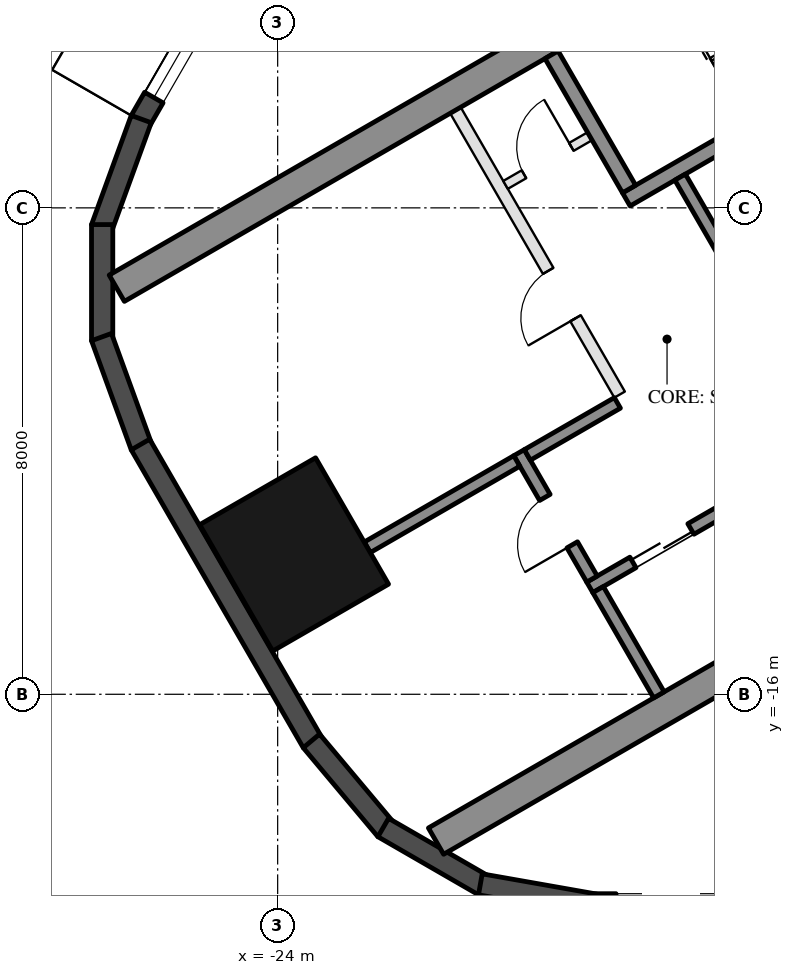
"""IFC4 building model, lengths in metres.
Left out: names, types, materials, properties, quantities, classifications, styles, units other than length and angle.
Written with IfcOpenShell. Run it as: python <this file> out.ifc"""

import sys

from ifc_helpers import new_model, si_unit, direction, frame, frame_2d, origin, origin_2d, place, context, subcontext, project, spatial, rectangle, hollow_rectangle, extrude, element, fill, save


model = new_model("IFC4")
c1 = context("Model", 3, precision=1e-05, world=origin(), true_north=direction((0.0, 1.0)))
c2 = subcontext(c1, "Body", "Model", "MODEL_VIEW")
j1 = project(units=[si_unit("LENGTHUNIT", "METRE"), si_unit("PLANEANGLEUNIT", "RADIAN")], contexts=[c1])
p1 = place(None, origin())
s1 = spatial("IfcSite", under=j1, at=p1, CompositionType="ELEMENT")
p2 = place(p1, origin())
s2 = spatial("IfcBuilding", under=s1, at=p2, CompositionType="ELEMENT")
p3 = place(p2, frame((0.0, 0.0, 154.0)))
s3 = spatial("IfcBuildingStorey", under=s2, at=p3, CompositionType="ELEMENT", Elevation=154.0)
p4 = place(p3, frame((-23.729, -13.7, 0.0), z_axis=(0.0, 0.0, 1.0), x_axis=(-0.5, 0.866025403784, 0.0)))
e1 = element("IfcColumn", 1, at=p4, inside=s3, PredefinedType="COLUMN", context=c2, shape_type="SweptSolid", body=[
    extrude(hollow_rectangle(XDim=2.4, YDim=2.2, WallThickness=0.06, at=origin_2d()), origin(), (0.0, 0.0, 1.0), 3.7),
])
p5 = place(p3, frame((-24.299, -3.176, 0.0), z_axis=(0.0, 0.0, 1.0), x_axis=(-0.500028278809, -0.866009076391, 0.0)))
e2 = element("IfcWall", 2, at=p5, inside=s3, PredefinedType="SOLIDWALL", context=c2, shape_type="SweptSolid", body=[
    extrude(rectangle(XDim=3.916, YDim=0.35, at=frame_2d((1.958, 0.0))), origin(), (0.0, 0.0, 1.0), 3.55),
])
p6 = place(p5, frame((1.675, 0.0, 0.3)))
e3 = element("IfcOpeningElement", 3, at=p6, cuts=e2, PredefinedType="OPENING", context=c2, shape_type="SweptSolid", body=[
    extrude(rectangle(XDim=1.8, YDim=2.65, at=frame_2d((0.9, 1.325))), frame((0.0, 0.185, 0.0), z_axis=(0.0, -1.0, 0.0), x_axis=(1.0, 0.0, 0.0)), (0.0, 0.0, 1.0), 0.37),
])
for number, where, z_axis, x_axis in (
    (4, (-26.244, -6.54, 0.0), (0.0, 0.0, 1.0), (-0.342, -0.94, 0.0)),
    (5, (-26.886, -8.275, 0.0), (0.0, 0.0, 1.0), (0.0, -1.0, 0.0)),
    (6, (-26.897, -10.125, 0.0), (0.0, 0.0, 1.0), (0.342, -0.94, 0.0)),
):
    element("IfcWall", number, at=place(p3, frame(where, z_axis=z_axis, x_axis=x_axis)), inside=s3, PredefinedType="SOLIDWALL", context=c2, shape_type="SweptSolid", body=[
        extrude(rectangle(XDim=1.91, YDim=0.35, at=frame_2d((0.955, 0.0))), origin(), (0.0, 0.0, 1.0), 3.55),
    ])
p7 = place(p3, frame((-26.257, -11.893, 0.0), z_axis=(0.0, 0.0, 1.0), x_axis=(0.500018773155, -0.866014564827, 0.0)))
e7 = element("IfcWall", 7, at=p7, inside=s3, PredefinedType="SOLIDWALL", context=c2, shape_type="SweptSolid", body=[
    extrude(rectangle(XDim=5.658, YDim=0.35, at=frame_2d((2.829, 0.0))), origin(), (0.0, 0.0, 1.0), 3.55),
])
for number, where, z_axis, x_axis in (
    (8, (-23.445, -16.768, 0.0), (0.0, 0.0, 1.0), (0.643, -0.766, 0.0)),
    (9, (-22.264, -18.192, 0.0), (0.0, 0.0, 1.0), (0.866, -0.5, 0.0)),
):
    element("IfcWall", number, at=place(p3, frame(where, z_axis=z_axis, x_axis=x_axis)), inside=s3, PredefinedType="SOLIDWALL", context=c2, shape_type="SweptSolid", body=[
        extrude(rectangle(XDim=1.91, YDim=0.35, at=frame_2d((0.955, 0.0))), origin(), (0.0, 0.0, 1.0), 3.55),
    ])
p8 = place(p3, frame((-20.667, -19.126, 0.0), z_axis=(0.0, 0.0, 1.0), x_axis=(0.984798995425, -0.173697837091, 0.0)))
e10 = element("IfcWall", 10, at=p8, inside=s3, PredefinedType="SOLIDWALL", context=c2, shape_type="SweptSolid", body=[
    extrude(rectangle(XDim=1.91, YDim=0.35, at=frame_2d((0.955, 0.0))), origin(), (0.0, 0.0, 1.0), 3.55),
])
p9 = place(p3, frame((-18.816, -19.455, 0.0), z_axis=(0.0, 0.0, 1.0), x_axis=(1.0, 0.0, 0.0)))
e11 = element("IfcWall", 11, at=p9, inside=s3, PredefinedType="SOLIDWALL", context=c2, shape_type="SweptSolid", body=[
    extrude(rectangle(XDim=11.816, YDim=0.35, at=frame_2d((5.908, 0.0))), origin(), (0.0, 0.0, 1.0), 3.55),
])
p10 = place(p9, frame((0.381, 0.0, 0.3)))
e12 = element("IfcOpeningElement", 12, at=p10, cuts=e11, PredefinedType="OPENING", context=c2, shape_type="SweptSolid", body=[
    extrude(rectangle(XDim=1.8, YDim=2.65, at=frame_2d((0.9, 1.325))), frame((0.0, 0.185, 0.0), z_axis=(0.0, -1.0, 0.0), x_axis=(1.0, 0.0, 0.0)), (0.0, 0.0, 1.0), 0.37),
])
p11 = place(p9, frame((7.74, 0.0, 0.0)))
e13 = element("IfcOpeningElement", 13, at=p11, cuts=e11, PredefinedType="OPENING", context=c2, shape_type="SweptSolid", body=[
    extrude(rectangle(XDim=2.4, YDim=2.4, at=frame_2d((1.2, 1.2))), frame((0.0, 0.185, 0.0), z_axis=(0.0, -1.0, 0.0), x_axis=(1.0, 0.0, 0.0)), (0.0, 0.0, 1.0), 0.37),
])
p12 = place(p9, frame((3.791, 0.0, 0.3)))
e14 = element("IfcOpeningElement", 14, at=p12, cuts=e11, PredefinedType="OPENING", context=c2, shape_type="SweptSolid", body=[
    extrude(rectangle(XDim=1.6, YDim=2.65, at=frame_2d((0.8, 1.325))), frame((0.0, 0.185, 0.0), z_axis=(0.0, -1.0, 0.0), x_axis=(1.0, 0.0, 0.0)), (0.0, 0.0, 1.0), 0.37),
])
p13 = place(p9, frame((5.691, 0.0, 0.3)))
e15 = element("IfcOpeningElement", 15, at=p13, cuts=e11, PredefinedType="OPENING", context=c2, shape_type="SweptSolid", body=[
    extrude(rectangle(XDim=1.6, YDim=2.65, at=frame_2d((0.8, 1.325))), frame((0.0, 0.185, 0.0), z_axis=(0.0, -1.0, 0.0), x_axis=(1.0, 0.0, 0.0)), (0.0, 0.0, 1.0), 0.37),
])
for number, where, z_axis, x_axis in (
    (16, (-13.797, -1.903, 0.0), (0.0, 0.0, 1.0), (-0.866, -0.5, 0.0)),
    (17, (-8.547, -10.997, 0.0), (0.0, 0.0, 1.0), (-0.866, -0.5, 0.0)),
):
    element("IfcWall", number, at=place(p3, frame(where, z_axis=z_axis, x_axis=x_axis)), inside=s3, PredefinedType="SHEAR", context=c2, shape_type="SweptSolid", body=[
        extrude(rectangle(XDim=14.837, YDim=0.5, at=frame_2d((7.418, 0.0))), origin(), (0.0, 0.0, 1.0), 3.5),
    ])
p14 = place(p3, frame((-12.681, -4.636, 0.0), z_axis=(0.0, 0.0, 1.0), x_axis=(-0.866021702275, -0.500006411147, 0.0)))
e18 = element("IfcWall", 18, at=p14, inside=s3, PredefinedType="SHEAR", context=c2, shape_type="SweptSolid", body=[
    extrude(rectangle(XDim=6.45, YDim=0.25, at=frame_2d((3.225, 0.0))), origin(), (0.0, 0.0, 1.0), 3.5),
])
p15 = place(p14, frame((0.3, 0.0, 0.0)))
e19 = element("IfcOpeningElement", 19, at=p15, cuts=e18, PredefinedType="OPENING", context=c2, shape_type="SweptSolid", body=[
    extrude(rectangle(XDim=1.0, YDim=2.1, at=frame_2d((0.5, 1.05))), frame((0.0, 0.135, 0.0), z_axis=(0.0, -1.0, 0.0), x_axis=(1.0, 0.0, 0.0)), (0.0, 0.0, 1.0), 0.27),
])
p16 = place(p3, frame((-19.496, -5.482, 0.0), z_axis=(0.0, 0.0, 1.0), x_axis=(0.499990435942, -0.866030925526, 0.0)))
e20 = element("IfcWall", 20, at=p16, inside=s3, PredefinedType="SHEAR", context=c2, shape_type="SweptSolid", body=[
    extrude(rectangle(XDim=2.55, YDim=0.25, at=frame_2d((1.275, 0.0))), origin(), (0.0, 0.0, 1.0), 3.5),
])
p17 = place(p3, frame((-17.381, -7.495, 0.0), z_axis=(0.0, 0.0, 1.0), x_axis=(0.500011755427, -0.866018616679, 0.0)))
e21 = element("IfcWall", 21, at=p17, inside=s3, PredefinedType="SHEAR", context=c2, shape_type="SweptSolid", body=[
    extrude(rectangle(XDim=2.8, YDim=0.2, at=frame_2d((1.4, 0.0))), origin(), (0.0, 0.0, 1.0), 3.5),
])
p18 = place(p3, frame((-10.068, -9.162, 0.0), z_axis=(0.0, 0.0, 1.0), x_axis=(-0.866032725843, -0.499987317609, 0.0)))
e22 = element("IfcWall", 22, at=p18, inside=s3, PredefinedType="SHEAR", context=c2, shape_type="SweptSolid", body=[
    extrude(rectangle(XDim=10.16, YDim=0.2, at=frame_2d((5.08, 0.0))), origin(), (0.0, 0.0, 1.0), 3.5),
])
p19 = place(p18, frame((0.62, 0.0, 0.0)))
e23 = element("IfcOpeningElement", 23, at=p19, cuts=e22, PredefinedType="OPENING", context=c2, shape_type="SweptSolid", body=[
    extrude(rectangle(XDim=1.1, YDim=2.1, at=frame_2d((0.55, 1.05))), frame((0.0, 0.11, 0.0), z_axis=(0.0, -1.0, 0.0), x_axis=(1.0, 0.0, 0.0)), (0.0, 0.0, 1.0), 0.22),
])
p20 = place(p18, frame((3.16, 0.0, 0.0)))
e24 = element("IfcOpeningElement", 24, at=p20, cuts=e22, PredefinedType="OPENING", context=c2, shape_type="SweptSolid", body=[
    extrude(rectangle(XDim=1.1, YDim=2.1, at=frame_2d((0.55, 1.05))), frame((0.0, 0.11, 0.0), z_axis=(0.0, -1.0, 0.0), x_axis=(1.0, 0.0, 0.0)), (0.0, 0.0, 1.0), 0.22),
])
p21 = place(p18, frame((5.7, 0.0, 0.0)))
e25 = element("IfcOpeningElement", 25, at=p21, cuts=e22, PredefinedType="OPENING", context=c2, shape_type="SweptSolid", body=[
    extrude(rectangle(XDim=1.1, YDim=2.1, at=frame_2d((0.55, 1.05))), frame((0.0, 0.11, 0.0), z_axis=(0.0, -1.0, 0.0), x_axis=(1.0, 0.0, 0.0)), (0.0, 0.0, 1.0), 0.22),
])
p22 = place(p18, frame((8.24, 0.0, 0.0)))
e26 = element("IfcOpeningElement", 26, at=p22, cuts=e22, PredefinedType="OPENING", context=c2, shape_type="SweptSolid", body=[
    extrude(rectangle(XDim=1.1, YDim=2.1, at=frame_2d((0.55, 1.05))), frame((0.0, 0.11, 0.0), z_axis=(0.0, -1.0, 0.0), x_axis=(1.0, 0.0, 0.0)), (0.0, 0.0, 1.0), 0.22),
])
p23 = place(p3, frame((-20.031, -12.026, 0.0), z_axis=(0.0, 0.0, 1.0), x_axis=(0.500033551112, -0.866006032174, 0.0)))
e27 = element("IfcWall", 27, at=p23, inside=s3, PredefinedType="SHEAR", context=c2, shape_type="SweptSolid", body=[
    extrude(rectangle(XDim=2.4, YDim=0.2, at=frame_2d((1.2, 0.0))), origin(), (0.0, 0.0, 1.0), 3.5),
])
p24 = place(p23, frame((0.85, 0.0, 0.0)))
e28 = element("IfcOpeningElement", 28, at=p24, cuts=e27, PredefinedType="OPENING", context=c2, shape_type="SweptSolid", body=[
    extrude(rectangle(XDim=0.9, YDim=2.1, at=frame_2d((0.45, 1.05))), frame((0.0, 0.11, 0.0), z_axis=(0.0, -1.0, 0.0), x_axis=(1.0, 0.0, 0.0)), (0.0, 0.0, 1.0), 0.22),
])
p25 = place(p3, frame((-18.413, -11.208, 0.0), z_axis=(0.0, 0.0, 1.0), x_axis=(-0.866038183914, -0.499977863513, 0.0)))
e29 = element("IfcWall", 29, at=p25, inside=s3, PredefinedType="SHEAR", context=c2, shape_type="SweptSolid", body=[
    extrude(rectangle(XDim=1.71, YDim=0.2, at=frame_2d((0.855, 0.0))), origin(), (0.0, 0.0, 1.0), 3.5),
])
p26 = place(p3, frame((-18.73, -14.278, 0.0), z_axis=(0.0, 0.0, 1.0), x_axis=(0.50002537861, -0.866010750942, 0.0)))
e30 = element("IfcWall", 30, at=p26, inside=s3, PredefinedType="SHEAR", context=c2, shape_type="SweptSolid", body=[
    extrude(rectangle(XDim=2.0, YDim=0.2, at=frame_2d((1.0, 0.0))), origin(), (0.0, 0.0, 1.0), 3.5),
])
p27 = place(p3, frame((-20.067, -12.163, 0.0), z_axis=(0.0, 0.0, 1.0), x_axis=(-0.866055327414, -0.49994816717, 0.0)))
e31 = element("IfcWall", 31, at=p27, inside=s3, PredefinedType="SHEAR", context=c2, shape_type="SweptSolid", body=[
    extrude(rectangle(XDim=2.84, YDim=0.2, at=frame_2d((1.42, 0.0))), origin(), (0.0, 0.0, 1.0), 3.5),
])
p28 = place(p3, frame((-21.076, -6.395, 0.0), z_axis=(0.0, 0.0, 1.0), x_axis=(0.50001468107, -0.866016927499, 0.0)))
e32 = element("IfcWall", 32, at=p28, inside=s3, PredefinedType="PARTITIONING", context=c2, shape_type="SweptSolid", body=[
    extrude(rectangle(XDim=5.4, YDim=0.2, at=frame_2d((2.7, 0.0))), origin(), (0.0, 0.0, 1.0), 3.5),
])
p29 = place(p28, frame((3.05, 0.0, 0.0)))
e33 = element("IfcOpeningElement", 33, at=p29, cuts=e32, PredefinedType="OPENING", context=c2, shape_type="SweptSolid", body=[
    extrude(rectangle(XDim=0.9, YDim=2.1, at=frame_2d((0.45, 1.05))), frame((0.0, 0.11, 0.0), z_axis=(0.0, -1.0, 0.0), x_axis=(1.0, 0.0, 0.0)), (0.0, 0.0, 1.0), 0.22),
])
p30 = place(p3, frame((-18.866, -6.822, 0.0), z_axis=(0.0, 0.0, 1.0), x_axis=(-0.866028054938, -0.499995408039, 0.0)))
e34 = element("IfcWall", 34, at=p30, inside=s3, PredefinedType="PARTITIONING", context=c2, shape_type="SweptSolid", body=[
    extrude(rectangle(XDim=1.6, YDim=0.15, at=frame_2d((0.8, 0.0))), origin(), (0.0, 0.0, 1.0), 3.5),
])
p31 = place(p30, frame((0.35, 0.0, 0.0)))
e35 = element("IfcOpeningElement", 35, at=p31, cuts=e34, PredefinedType="OPENING", context=c2, shape_type="SweptSolid", body=[
    extrude(rectangle(XDim=0.9, YDim=2.1, at=frame_2d((0.45, 1.05))), frame((0.0, 0.085, 0.0), z_axis=(0.0, -1.0, 0.0), x_axis=(1.0, 0.0, 0.0)), (0.0, 0.0, 1.0), 0.17),
])
p32 = place(p6, origin())
e36 = element("IfcWindow", 36, at=p32, inside=s3, PartitioningType="SINGLE_PANEL", PredefinedType="WINDOW", context=c2, shape_type="SweptSolid", body=[
    extrude(rectangle(XDim=1.8, YDim=2.65, at=frame_2d((0.9, 1.325))), frame((0.0, 0.03, 0.0), z_axis=(0.0, -1.0, 0.0), x_axis=(1.0, 0.0, 0.0)), (0.0, 0.0, 1.0), 0.06),
])
fill(e3, e36)
p33 = place(p31, frame((0.9, 0.0, 0.0), z_axis=(0.0, 0.0, 1.0), x_axis=(-1.0, 0.0, 0.0)))
e37 = element("IfcDoor", 37, at=p33, inside=s3, OperationType="SINGLE_SWING_RIGHT", PredefinedType="DOOR", context=c2, shape_type="SweptSolid", body=[
    extrude(rectangle(XDim=0.9, YDim=2.1, at=frame_2d((0.45, 1.05))), frame((0.0, 0.025, 0.0), z_axis=(0.0, -1.0, 0.0), x_axis=(1.0, 0.0, 0.0)), (0.0, 0.0, 1.0), 0.05),
])
fill(e35, e37)
p34 = place(p22, origin())
e38 = element("IfcDoor", 38, at=p34, inside=s3, OperationType="DOUBLE_DOOR_SLIDING", PredefinedType="DOOR", context=c2, shape_type="SweptSolid", body=[
    extrude(rectangle(XDim=1.1, YDim=2.1, at=frame_2d((0.55, 1.05))), frame((0.0, 0.025, 0.0), z_axis=(0.0, -1.0, 0.0), x_axis=(1.0, 0.0, 0.0)), (0.0, 0.0, 1.0), 0.05),
])
fill(e26, e38)
p35 = place(p24, frame((0.9, 0.0, 0.0), z_axis=(0.0, 0.0, 1.0), x_axis=(-1.0, 0.0, 0.0)))
e39 = element("IfcDoor", 39, at=p35, inside=s3, OperationType="SINGLE_SWING_LEFT", PredefinedType="DOOR", context=c2, shape_type="SweptSolid", body=[
    extrude(rectangle(XDim=0.9, YDim=2.1, at=frame_2d((0.45, 1.05))), frame((0.0, 0.025, 0.0), z_axis=(0.0, -1.0, 0.0), x_axis=(1.0, 0.0, 0.0)), (0.0, 0.0, 1.0), 0.05),
])
fill(e28, e39)
p36 = place(p29, frame((0.9, 0.0, 0.0), z_axis=(0.0, 0.0, 1.0), x_axis=(-1.0, 0.0, 0.0)))
e40 = element("IfcDoor", 40, at=p36, inside=s3, OperationType="SINGLE_SWING_LEFT", PredefinedType="DOOR", context=c2, shape_type="SweptSolid", body=[
    extrude(rectangle(XDim=0.9, YDim=2.1, at=frame_2d((0.45, 1.05))), frame((0.0, 0.025, 0.0), z_axis=(0.0, -1.0, 0.0), x_axis=(1.0, 0.0, 0.0)), (0.0, 0.0, 1.0), 0.05),
])
fill(e33, e40)
save(model, sys.argv[1])
